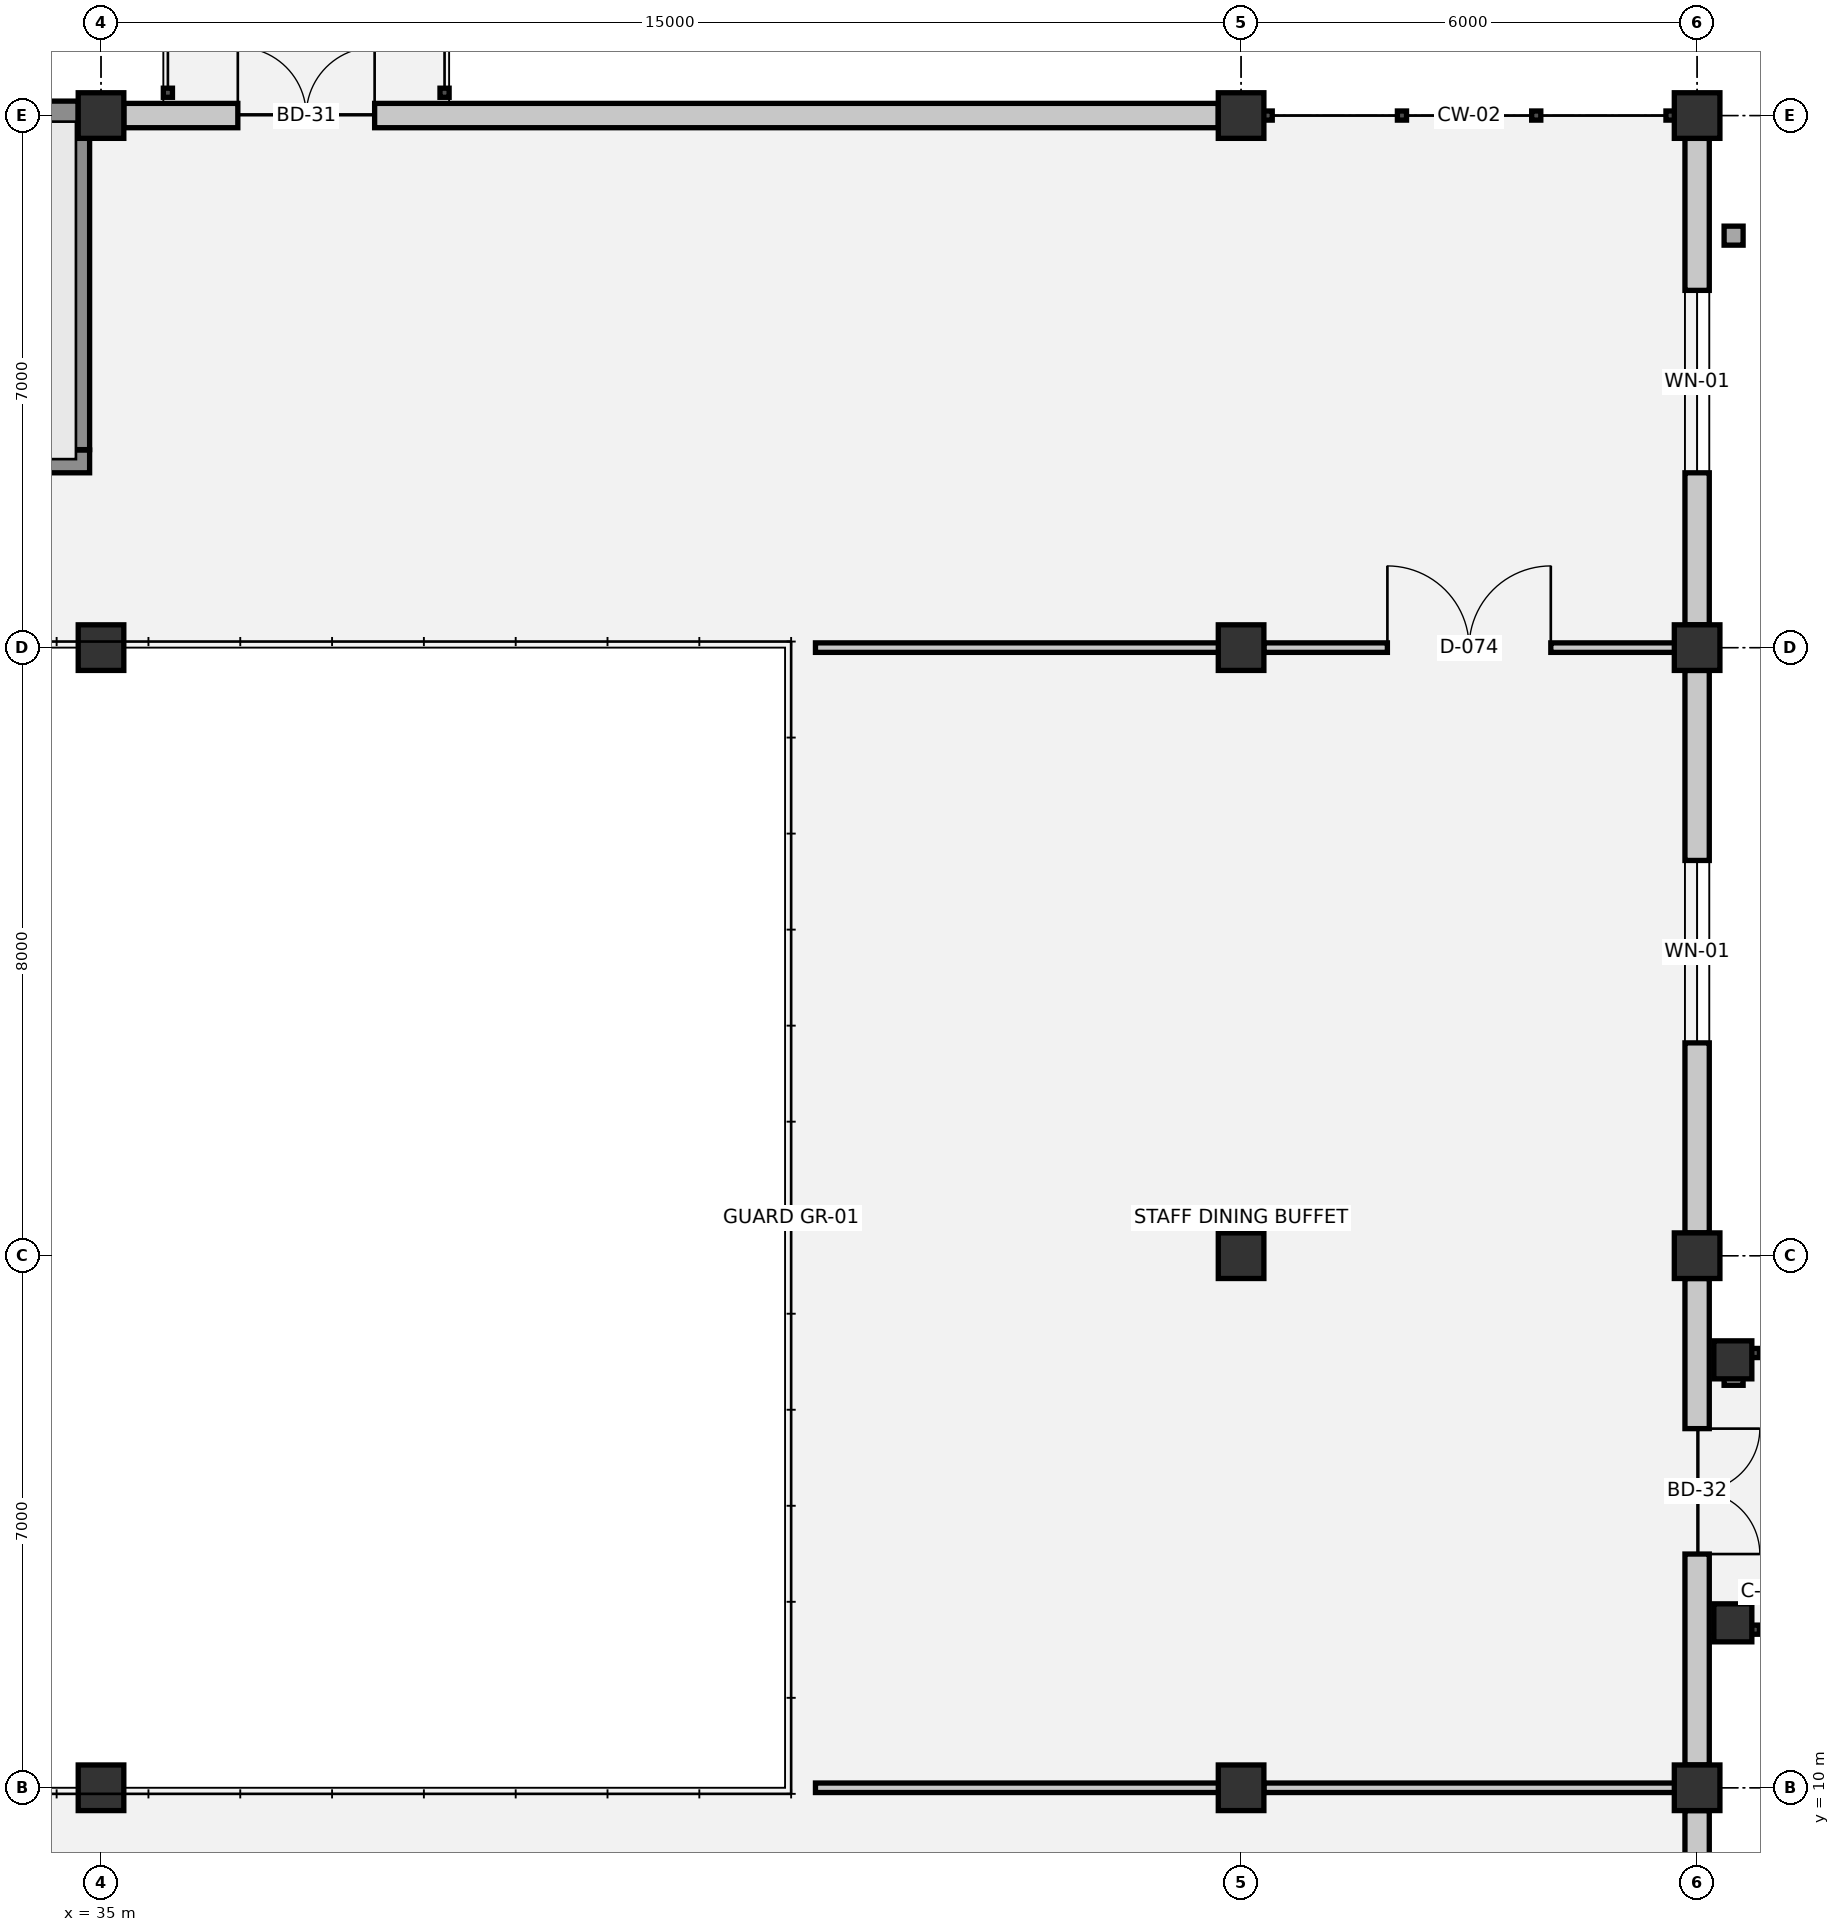
"""IFC4 building model, lengths in metres.
Left out: names, types, materials, properties, quantities, classifications, styles, units other than length and angle.
Written with IfcOpenShell. Run it as: python <this file> out.ifc"""

import sys

from ifc_helpers import new_model, si_unit, direction, frame, frame_2d, origin, origin_2d, place, context, subcontext, project, spatial, rectangle, extrude, element, fill, save


model = new_model("IFC4")
c1 = context("Model", 3, precision=1e-05, world=origin(), true_north=direction((0.0, 1.0)))
c2 = subcontext(c1, "Body", "Model", "MODEL_VIEW")
j1 = project(units=[si_unit("LENGTHUNIT", "METRE"), si_unit("PLANEANGLEUNIT", "RADIAN")], contexts=[c1])
p1 = place(None, origin())
s1 = spatial("IfcSite", under=j1, at=p1, CompositionType="ELEMENT")
p2 = place(p1, origin())
s2 = spatial("IfcBuilding", under=s1, at=p2, CompositionType="ELEMENT")
p3 = place(p2, frame((0.0, 0.0, 9.9)))
s3 = spatial("IfcBuildingStorey", under=s2, at=p3, CompositionType="ELEMENT", Elevation=9.9)
for number, where, z_axis, x_axis in (
    (1, (35.0, 10.0, 0.0), (0.0, 0.0, 1.0), (1.0, 0.0, 0.0)),
    (2, (35.0, 25.0, 0.0), (0.0, 0.0, 1.0), (1.0, 0.0, 0.0)),
    (3, (35.0, 32.0, 0.0), (0.0, 0.0, 1.0), (1.0, 0.0, 0.0)),
    (4, (50.0, 10.0, 0.0), (0.0, 0.0, 1.0), (1.0, 0.0, 0.0)),
    (5, (50.0, 17.0, 0.0), (0.0, 0.0, 1.0), (1.0, 0.0, 0.0)),
    (6, (50.0, 25.0, 0.0), (0.0, 0.0, 1.0), (1.0, 0.0, 0.0)),
    (7, (50.0, 32.0, 0.0), (0.0, 0.0, 1.0), (1.0, 0.0, 0.0)),
    (8, (56.0, 10.0, 0.0), (0.0, 0.0, 1.0), (1.0, 0.0, 0.0)),
    (9, (56.0, 17.0, 0.0), (0.0, 0.0, 1.0), (1.0, 0.0, 0.0)),
    (10, (56.0, 25.0, 0.0), (0.0, 0.0, 1.0), (1.0, 0.0, 0.0)),
    (11, (56.0, 32.0, 0.0), (0.0, 0.0, 1.0), (1.0, 0.0, 0.0)),
):
    element("IfcColumn", number, at=place(p3, frame(where, z_axis=z_axis, x_axis=x_axis)), inside=s3, PredefinedType="COLUMN", context=c2, shape_type="SweptSolid", body=[
        extrude(rectangle(XDim=0.6, YDim=0.6, at=origin_2d()), origin(), (0.0, 0.0, 1.0), 4.5),
    ])
for number, where, z_axis, x_axis in (
    (12, (56.47, 12.17, 0.0), (0.0, 0.0, 1.0), (1.0, 0.0, 0.0)),
    (13, (56.47, 15.63, 0.0), (0.0, 0.0, 1.0), (1.0, 0.0, 0.0)),
):
    element("IfcColumn", number, at=place(p3, frame(where, z_axis=z_axis, x_axis=x_axis)), inside=s3, PredefinedType="COLUMN", context=c2, shape_type="SweptSolid", body=[
        extrude(rectangle(XDim=0.5, YDim=0.5, at=origin_2d()), origin(), (0.0, 0.0, 1.0), 4.27),
    ])
p4 = place(p3, frame((20.3, 32.0, 0.0), z_axis=(0.0, 0.0, 1.0), x_axis=(1.0, 0.0, 0.0)))
e14 = element("IfcWall", 14, at=p4, inside=s3, PredefinedType="STANDARD", context=c2, shape_type="SweptSolid", body=[
    extrude(rectangle(XDim=14.4, YDim=0.38, at=frame_2d((7.2, 0.0))), origin(), (0.0, 0.0, 1.0), 3.26),
])
p5 = place(p4, frame((3.78, 0.0, 0.95)))
e15 = element("IfcOpeningElement", 15, at=p5, cuts=e14, PredefinedType="OPENING", context=c2, shape_type="SweptSolid", body=[
    extrude(rectangle(XDim=2.7, YDim=1.35, at=frame_2d((1.35, 0.675))), frame((0.0, 0.2, 0.0), z_axis=(0.0, -1.0, 0.0), x_axis=(1.0, 0.0, 0.0)), (0.0, 0.0, 1.0), 0.4),
])
p6 = place(p3, frame((35.3, 32.0, 0.0), z_axis=(0.0, 0.0, 1.0), x_axis=(1.0, 0.0, 0.0)))
e16 = element("IfcWall", 16, at=p6, inside=s3, PredefinedType="SOLIDWALL", context=c2, shape_type="SweptSolid", body=[
    extrude(rectangle(XDim=14.4, YDim=0.32, at=frame_2d((7.2, 0.0))), origin(), (0.0, 0.0, 1.0), 3.26),
])
p7 = place(p6, frame((1.5, 0.0, 0.0)))
e17 = element("IfcOpeningElement", 17, at=p7, cuts=e16, PredefinedType="OPENING", context=c2, shape_type="SweptSolid", body=[
    extrude(rectangle(XDim=1.8, YDim=2.25, at=frame_2d((0.9, 1.125))), frame((0.0, 0.17, 0.0), z_axis=(0.0, -1.0, 0.0), x_axis=(1.0, 0.0, 0.0)), (0.0, 0.0, 1.0), 0.34),
])
p8 = place(p3, frame((56.0, 31.7, 0.0), z_axis=(0.0, 0.0, 1.0), x_axis=(0.0, -1.0, 0.0)))
e18 = element("IfcWall", 18, at=p8, inside=s3, PredefinedType="SOLIDWALL", context=c2, shape_type="SweptSolid", body=[
    extrude(rectangle(XDim=6.4, YDim=0.32, at=frame_2d((3.2, 0.0))), origin(), (0.0, 0.0, 1.0), 3.26),
])
p9 = place(p8, frame((2.0, 0.0, 0.9)))
e19 = element("IfcOpeningElement", 19, at=p9, cuts=e18, PredefinedType="OPENING", context=c2, shape_type="SweptSolid", body=[
    extrude(rectangle(XDim=2.4, YDim=2.1, at=frame_2d((1.2, 1.05))), frame((0.0, 0.17, 0.0), z_axis=(0.0, -1.0, 0.0), x_axis=(1.0, 0.0, 0.0)), (0.0, 0.0, 1.0), 0.34),
])
p10 = place(p3, frame((56.0, 24.7, 0.0), z_axis=(0.0, 0.0, 1.0), x_axis=(0.0, -1.0, 0.0)))
e20 = element("IfcWall", 20, at=p10, inside=s3, PredefinedType="SOLIDWALL", context=c2, shape_type="SweptSolid", body=[
    extrude(rectangle(XDim=7.4, YDim=0.32, at=frame_2d((3.7, 0.0))), origin(), (0.0, 0.0, 1.0), 3.26),
])
p11 = place(p10, frame((2.5, 0.0, 0.9)))
e21 = element("IfcOpeningElement", 21, at=p11, cuts=e20, PredefinedType="OPENING", context=c2, shape_type="SweptSolid", body=[
    extrude(rectangle(XDim=2.4, YDim=2.1, at=frame_2d((1.2, 1.05))), frame((0.0, 0.17, 0.0), z_axis=(0.0, -1.0, 0.0), x_axis=(1.0, 0.0, 0.0)), (0.0, 0.0, 1.0), 0.34),
])
p12 = place(p3, frame((56.0, 16.7, 0.0), z_axis=(0.0, 0.0, 1.0), x_axis=(0.0, -1.0, 0.0)))
e22 = element("IfcWall", 22, at=p12, inside=s3, PredefinedType="SOLIDWALL", context=c2, shape_type="SweptSolid", body=[
    extrude(rectangle(XDim=6.4, YDim=0.32, at=frame_2d((3.2, 0.0))), origin(), (0.0, 0.0, 1.0), 3.26),
])
p13 = place(p12, frame((1.975, 0.0, 0.0)))
e23 = element("IfcOpeningElement", 23, at=p13, cuts=e22, PredefinedType="OPENING", context=c2, shape_type="SweptSolid", body=[
    extrude(rectangle(XDim=1.65, YDim=2.2, at=frame_2d((0.825, 1.1))), frame((0.0, 0.17, 0.0), z_axis=(0.0, -1.0, 0.0), x_axis=(1.0, 0.0, 0.0)), (0.0, 0.0, 1.0), 0.34),
])
p14 = place(p3, frame((56.0, 9.7, 0.0), z_axis=(0.0, 0.0, 1.0), x_axis=(0.0, -1.0, 0.0)))
e24 = element("IfcWall", 24, at=p14, inside=s3, PredefinedType="SOLIDWALL", context=c2, shape_type="SweptSolid", body=[
    extrude(rectangle(XDim=5.4, YDim=0.32, at=frame_2d((2.7, 0.0))), origin(), (0.0, 0.0, 1.0), 3.26),
])
p15 = place(p14, frame((2.12, 0.0, 0.9)))
e25 = element("IfcOpeningElement", 25, at=p15, cuts=e24, PredefinedType="OPENING", context=c2, shape_type="SweptSolid", body=[
    extrude(rectangle(XDim=2.4, YDim=2.1, at=frame_2d((1.2, 1.05))), frame((0.0, 0.17, 0.0), z_axis=(0.0, -1.0, 0.0), x_axis=(1.0, 0.0, 0.0)), (0.0, 0.0, 1.0), 0.34),
])
p16 = place(p3, frame((27.15, 27.45, 0.0), z_axis=(0.0, 0.0, 1.0), x_axis=(1.0, 0.0, 0.0)))
e26 = element("IfcWall", 26, at=p16, inside=s3, PredefinedType="SHEAR", context=c2, shape_type="SweptSolid", body=[
    extrude(rectangle(XDim=7.7, YDim=0.3, at=frame_2d((3.85, 0.0))), origin(), (0.0, 0.0, 1.0), 4.24),
])
p17 = place(p16, frame((0.425, 0.0, 0.0)))
e27 = element("IfcOpeningElement", 27, at=p17, cuts=e26, PredefinedType="OPENING", context=c2, shape_type="SweptSolid", body=[
    extrude(rectangle(XDim=1.25, YDim=2.15, at=frame_2d((0.625, 1.075))), frame((0.0, 0.16, 0.0), z_axis=(0.0, -1.0, 0.0), x_axis=(1.0, 0.0, 0.0)), (0.0, 0.0, 1.0), 0.32),
])
p18 = place(p3, frame((34.7, 27.605, 0.0), z_axis=(0.0, 0.0, 1.0), x_axis=(0.0, 1.0, 0.0)))
e28 = element("IfcWall", 28, at=p18, inside=s3, PredefinedType="SHEAR", context=c2, shape_type="SweptSolid", body=[
    extrude(rectangle(XDim=4.2, YDim=0.3, at=frame_2d((2.1, 0.0))), origin(), (0.0, 0.0, 1.0), 4.24),
])
p19 = place(p3, frame((44.4, 10.0, 0.0), z_axis=(0.0, 0.0, 1.0), x_axis=(1.0, 0.0, 0.0)))
e29 = element("IfcWall", 29, at=p19, inside=s3, PredefinedType="PARTITIONING", context=c2, shape_type="SweptSolid", body=[
    extrude(rectangle(XDim=5.9, YDim=0.125, at=frame_2d((2.95, 0.0))), origin(), (0.0, 0.0, 1.0), 3.28),
])
p20 = place(p3, frame((50.3, 10.0, 0.0), z_axis=(0.0, 0.0, 1.0), x_axis=(1.0, 0.0, 0.0)))
e30 = element("IfcWall", 30, at=p20, inside=s3, PredefinedType="PARTITIONING", context=c2, shape_type="SweptSolid", body=[
    extrude(rectangle(XDim=5.62, YDim=0.125, at=frame_2d((2.81, 0.0))), origin(), (0.0, 0.0, 1.0), 3.53),
])
p21 = place(p3, frame((44.4, 25.0, 0.0), z_axis=(0.0, 0.0, 1.0), x_axis=(1.0, 0.0, 0.0)))
e31 = element("IfcWall", 31, at=p21, inside=s3, PredefinedType="PARTITIONING", context=c2, shape_type="SweptSolid", body=[
    extrude(rectangle(XDim=5.9, YDim=0.125, at=frame_2d((2.95, 0.0))), origin(), (0.0, 0.0, 1.0), 3.28),
])
p22 = place(p3, frame((50.3, 25.0, 0.0), z_axis=(0.0, 0.0, 1.0), x_axis=(1.0, 0.0, 0.0)))
e32 = element("IfcWall", 32, at=p22, inside=s3, PredefinedType="PARTITIONING", context=c2, shape_type="SweptSolid", body=[
    extrude(rectangle(XDim=5.62, YDim=0.125, at=frame_2d((2.81, 0.0))), origin(), (0.0, 0.0, 1.0), 3.53),
])
p23 = place(p22, frame((1.625, 0.0, 0.0)))
e33 = element("IfcOpeningElement", 33, at=p23, cuts=e32, PredefinedType="OPENING", context=c2, shape_type="SweptSolid", body=[
    extrude(rectangle(XDim=2.15, YDim=2.4, at=frame_2d((1.075, 1.2))), frame((0.0, 0.073, 0.0), z_axis=(0.0, -1.0, 0.0), x_axis=(1.0, 0.0, 0.0)), (0.0, 0.0, 1.0), 0.145),
])
p24 = place(p7, origin())
e34 = element("IfcDoor", 34, at=p24, inside=s3, OperationType="DOUBLE_DOOR_SINGLE_SWING", PredefinedType="DOOR", context=c2, shape_type="SweptSolid", body=[
    extrude(rectangle(XDim=1.8, YDim=2.25, at=frame_2d((0.9, 1.125))), frame((0.0, 0.025, 0.0), z_axis=(0.0, -1.0, 0.0), x_axis=(1.0, 0.0, 0.0)), (0.0, 0.0, 1.0), 0.05),
])
fill(e17, e34)
p25 = place(p9, origin())
e35 = element("IfcWindow", 35, at=p25, inside=s3, PartitioningType="SINGLE_PANEL", PredefinedType="WINDOW", context=c2, shape_type="SweptSolid", body=[
    extrude(rectangle(XDim=2.4, YDim=2.1, at=frame_2d((1.2, 1.05))), frame((0.0, 0.03, 0.0), z_axis=(0.0, -1.0, 0.0), x_axis=(1.0, 0.0, 0.0)), (0.0, 0.0, 1.0), 0.06),
])
fill(e19, e35)
p26 = place(p11, origin())
e36 = element("IfcWindow", 36, at=p26, inside=s3, PartitioningType="SINGLE_PANEL", PredefinedType="WINDOW", context=c2, shape_type="SweptSolid", body=[
    extrude(rectangle(XDim=2.4, YDim=2.1, at=frame_2d((1.2, 1.05))), frame((0.0, 0.03, 0.0), z_axis=(0.0, -1.0, 0.0), x_axis=(1.0, 0.0, 0.0)), (0.0, 0.0, 1.0), 0.06),
])
fill(e21, e36)
p27 = place(p13, origin())
e37 = element("IfcDoor", 37, at=p27, inside=s3, OperationType="DOUBLE_DOOR_SINGLE_SWING", PredefinedType="DOOR", context=c2, shape_type="SweptSolid", body=[
    extrude(rectangle(XDim=1.65, YDim=2.2, at=frame_2d((0.825, 1.1))), frame((0.0, 0.025, 0.0), z_axis=(0.0, -1.0, 0.0), x_axis=(1.0, 0.0, 0.0)), (0.0, 0.0, 1.0), 0.05),
])
fill(e23, e37)
p28 = place(p23, origin())
e38 = element("IfcDoor", 38, at=p28, inside=s3, OperationType="DOUBLE_DOOR_SINGLE_SWING", PredefinedType="DOOR", context=c2, shape_type="SweptSolid", body=[
    extrude(rectangle(XDim=2.15, YDim=2.4, at=frame_2d((1.075, 1.2))), frame((0.0, 0.025, 0.0), z_axis=(0.0, -1.0, 0.0), x_axis=(1.0, 0.0, 0.0)), (0.0, 0.0, 1.0), 0.05),
])
fill(e33, e38)
save(model, sys.argv[1])
